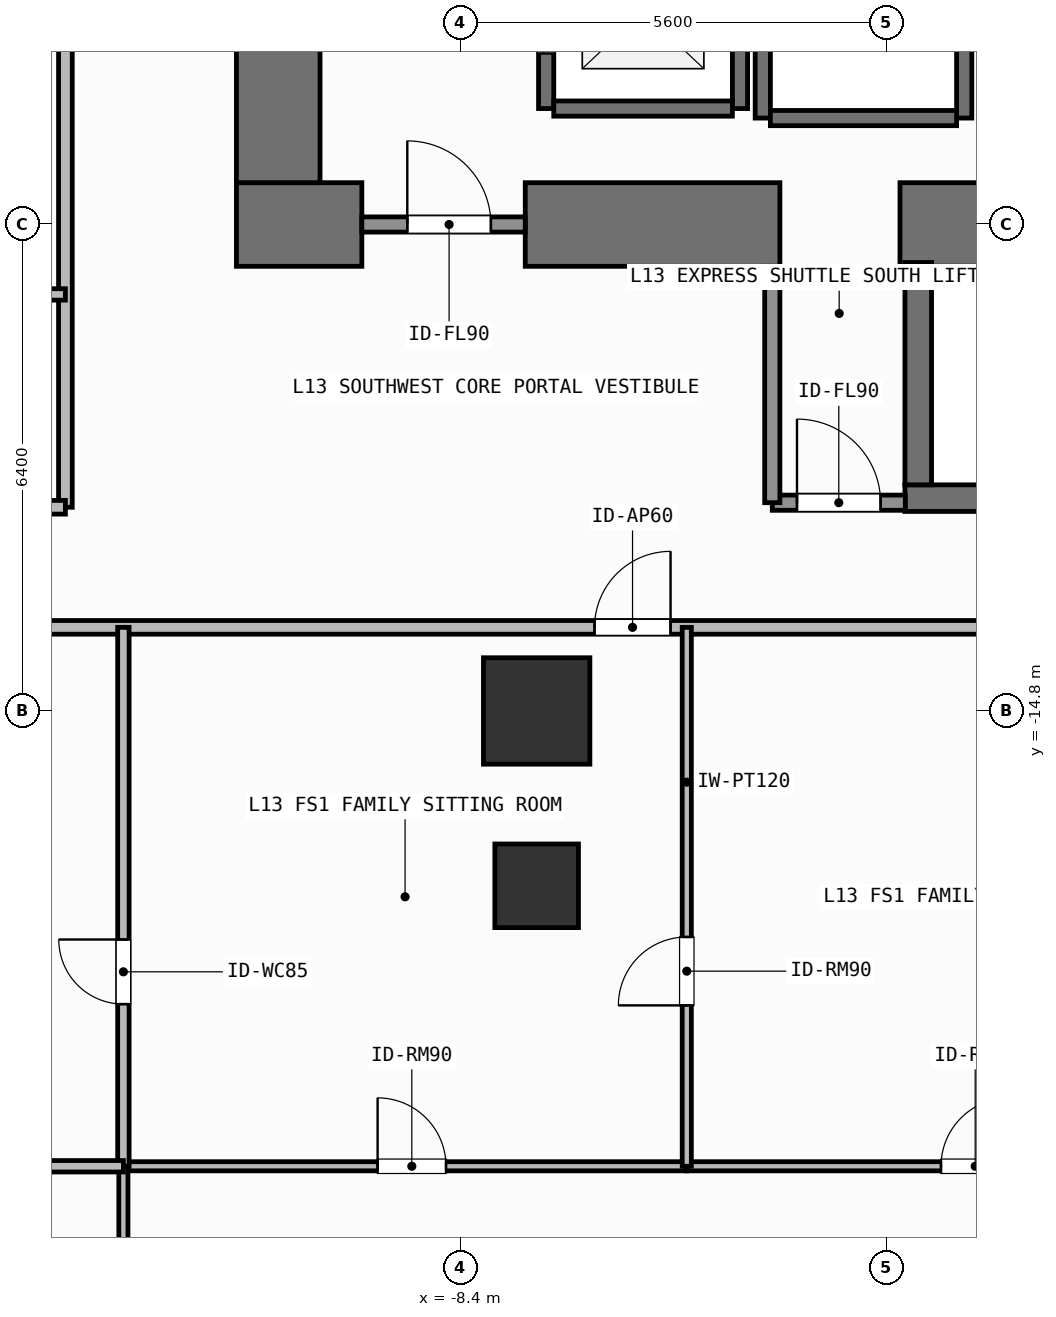
"""IFC4 building model, lengths in metres.
Left out: names, types, materials, properties, quantities, classifications, styles, units other than length and angle.
Written with IfcOpenShell. Run it as: python <this file> out.ifc"""

import sys

from ifc_helpers import new_model, si_unit, direction, frame, frame_2d, origin, origin_2d, place, context, subcontext, project, spatial, rectangle, extrude, element, fill, save


model = new_model("IFC4")
c1 = context("Model", 3, precision=1e-05, world=origin(), true_north=direction((0.0, 1.0)))
c2 = subcontext(c1, "Body", "Model", "MODEL_VIEW")
j1 = project(units=[si_unit("LENGTHUNIT", "METRE"), si_unit("PLANEANGLEUNIT", "RADIAN")], contexts=[c1])
p1 = place(None, origin())
s1 = spatial("IfcSite", under=j1, at=p1, CompositionType="ELEMENT")
p2 = place(p1, origin())
s2 = spatial("IfcBuilding", under=s1, at=p2, CompositionType="ELEMENT")
p3 = place(p2, frame((0.0, 0.0, 50.1)))
s3 = spatial("IfcBuildingStorey", under=s2, at=p3, CompositionType="ELEMENT", Elevation=50.1)
p4 = place(p3, frame((-11.35, -8.4, 0.0), z_axis=(0.0, 0.0, 1.0), x_axis=(1.0, 0.0, 0.0)))
e1 = element("IfcWall", 1, at=p4, inside=s3, PredefinedType="SHEAR", context=c2, shape_type="SweptSolid", body=[
    extrude(rectangle(XDim=1.65, YDim=1.1, at=frame_2d((0.825, 0.0))), origin(), (0.0, 0.0, 1.0), 3.9),
])
p5 = place(p3, frame((-7.55, -8.4, 0.0), z_axis=(0.0, 0.0, 1.0), x_axis=(1.0, 0.0, 0.0)))
e2 = element("IfcWall", 2, at=p5, inside=s3, PredefinedType="SHEAR", context=c2, shape_type="SweptSolid", body=[
    extrude(rectangle(XDim=3.35, YDim=1.1, at=frame_2d((1.675, 0.0))), origin(), (0.0, 0.0, 1.0), 3.9),
])
p6 = place(p3, frame((-2.62, -8.4, 0.0), z_axis=(0.0, 0.0, 1.0), x_axis=(1.0, 0.0, 0.0)))
e3 = element("IfcWall", 3, at=p6, inside=s3, PredefinedType="SHEAR", context=c2, shape_type="SweptSolid", body=[
    extrude(rectangle(XDim=7.27, YDim=1.1, at=frame_2d((3.635, 0.0))), origin(), (0.0, 0.0, 1.0), 3.9),
])
p7 = place(p3, frame((-10.8, -7.85, 0.0), z_axis=(0.0, 0.0, 1.0), x_axis=(0.0, 1.0, 0.0)))
e4 = element("IfcWall", 4, at=p7, inside=s3, PredefinedType="SHEAR", context=c2, shape_type="SweptSolid", body=[
    extrude(rectangle(XDim=15.7, YDim=1.1, at=frame_2d((7.85, 0.0))), origin(), (0.0, 0.0, 1.0), 3.9),
])
p8 = place(p3, frame((-2.555, -12.0, 0.0), z_axis=(0.0, 0.0, 1.0), x_axis=(1.0, 0.0, 0.0)))
e5 = element("IfcWall", 5, at=p8, inside=s3, PredefinedType="SHEAR", context=c2, shape_type="SweptSolid", body=[
    extrude(rectangle(XDim=7.31, YDim=0.35, at=frame_2d((3.655, 0.0))), origin(), (0.0, 0.0, 1.0), 3.9),
])
p9 = place(p3, frame((-2.2, -8.988, 0.0), z_axis=(0.0, 0.0, 1.0), x_axis=(1.0, 0.0, 0.0)))
e6 = element("IfcWall", 6, at=p9, inside=s3, PredefinedType="SHEAR", context=c2, shape_type="SweptSolid", body=[
    extrude(rectangle(XDim=6.6, YDim=0.075, at=frame_2d((3.3, 0.0))), origin(), (0.0, 0.0, 1.0), 3.9),
])
p10 = place(p3, frame((-2.38, -11.825, 0.0), z_axis=(0.0, 0.0, 1.0), x_axis=(0.0, 1.0, 0.0)))
e7 = element("IfcWall", 7, at=p10, inside=s3, PredefinedType="SHEAR", context=c2, shape_type="SweptSolid", body=[
    extrude(rectangle(XDim=2.925, YDim=0.35, at=frame_2d((1.462, 0.0))), origin(), (0.0, 0.0, 1.0), 3.9),
])
p11 = place(p3, frame((-7.4, -14.8, 0.0), z_axis=(0.0, 0.0, 1.0), x_axis=(1.0, 0.0, 0.0)))
e8 = element("IfcColumn", 8, at=p11, inside=s3, PredefinedType="COLUMN", context=c2, shape_type="SweptSolid", body=[
    extrude(rectangle(XDim=1.4, YDim=1.4, at=origin_2d()), origin(), (0.0, 0.0, 1.0), 3.9),
])
p12 = place(p3, frame((-7.4, -17.1, 0.0), z_axis=(0.0, 0.0, 1.0), x_axis=(1.0, 0.0, 0.0)))
e9 = element("IfcColumn", 9, at=p12, inside=s3, PredefinedType="COLUMN", context=c2, shape_type="SweptSolid", body=[
    extrude(rectangle(XDim=1.1, YDim=1.1, at=origin_2d()), origin(), (0.0, 0.0, 1.0), 3.9),
])
p13 = place(p3, frame((-7.275, -6.875, 0.0), z_axis=(0.0, 0.0, 1.0), x_axis=(0.0, 1.0, 0.0)))
e10 = element("IfcWall", 10, at=p13, inside=s3, PredefinedType="SHEAR", context=c2, shape_type="SweptSolid", body=[
    extrude(rectangle(XDim=2.55, YDim=0.2, at=frame_2d((1.275, 0.0))), origin(), (0.0, 0.0, 1.0), 3.62),
])
p14 = place(p13, frame((0.725, 0.0, 0.0)))
e11 = element("IfcOpeningElement", 11, at=p14, cuts=e10, PredefinedType="OPENING", context=c2, shape_type="SweptSolid", body=[
    extrude(rectangle(XDim=1.1, YDim=2.2, at=frame_2d((0.55, 1.1))), frame((0.0, 0.11, 0.0), z_axis=(0.0, -1.0, 0.0), x_axis=(1.0, 0.0, 0.0)), (0.0, 0.0, 1.0), 0.22),
])
p15 = place(p3, frame((-4.725, -6.875, 0.0), z_axis=(0.0, 0.0, 1.0), x_axis=(0.0, 1.0, 0.0)))
e12 = element("IfcWall", 12, at=p15, inside=s3, PredefinedType="SHEAR", context=c2, shape_type="SweptSolid", body=[
    extrude(rectangle(XDim=2.55, YDim=0.2, at=frame_2d((1.275, 0.0))), origin(), (0.0, 0.0, 1.0), 3.62),
])
p16 = place(p3, frame((-7.175, -6.875, 0.0), z_axis=(0.0, 0.0, 1.0), x_axis=(1.0, 0.0, 0.0)))
e13 = element("IfcWall", 13, at=p16, inside=s3, PredefinedType="SHEAR", context=c2, shape_type="SweptSolid", body=[
    extrude(rectangle(XDim=2.35, YDim=0.2, at=frame_2d((1.175, 0.0))), origin(), (0.0, 0.0, 1.0), 3.62),
])
for number, where, z_axis, x_axis in (
    (14, (-4.425, -7.0, 0.0), (0.0, 0.0, 1.0), (0.0, 1.0, 0.0)),
    (15, (-1.775, -7.0, 0.0), (0.0, 0.0, 1.0), (0.0, 1.0, 0.0)),
):
    element("IfcWall", number, at=place(p3, frame(where, z_axis=z_axis, x_axis=x_axis)), inside=s3, PredefinedType="SHEAR", context=c2, shape_type="SweptSolid", body=[
        extrude(rectangle(XDim=2.8, YDim=0.2, at=frame_2d((1.4, 0.0))), origin(), (0.0, 0.0, 1.0), 3.62),
    ])
p17 = place(p3, frame((-4.325, -7.0, 0.0), z_axis=(0.0, 0.0, 1.0), x_axis=(1.0, 0.0, 0.0)))
e16 = element("IfcWall", 16, at=p17, inside=s3, PredefinedType="SHEAR", context=c2, shape_type="SweptSolid", body=[
    extrude(rectangle(XDim=2.45, YDim=0.2, at=frame_2d((1.225, 0.0))), origin(), (0.0, 0.0, 1.0), 3.62),
])
p18 = place(p3, frame((-9.7, -8.4, 0.0), z_axis=(0.0, 0.0, 1.0), x_axis=(1.0, 0.0, 0.0)))
e17 = element("IfcWall", 17, at=p18, inside=s3, PredefinedType="SOLIDWALL", context=c2, shape_type="SweptSolid", body=[
    extrude(rectangle(XDim=2.15, YDim=0.2, at=frame_2d((1.075, 0.0))), origin(), (0.0, 0.0, 1.0), 2.66),
])
p19 = place(p18, frame((0.598, 0.0, 0.0)))
e18 = element("IfcOpeningElement", 18, at=p19, cuts=e17, PredefinedType="OPENING", context=c2, shape_type="SweptSolid", body=[
    extrude(rectangle(XDim=1.1, YDim=2.15, at=frame_2d((0.55, 1.075))), frame((0.0, 0.11, 0.0), z_axis=(0.0, -1.0, 0.0), x_axis=(1.0, 0.0, 0.0)), (0.0, 0.0, 1.0), 0.22),
])
p20 = place(p3, frame((-4.3, -12.06, 0.0), z_axis=(0.0, 0.0, 1.0), x_axis=(1.0, 0.0, 0.0)))
e19 = element("IfcWall", 19, at=p20, inside=s3, PredefinedType="SOLIDWALL", context=c2, shape_type="SweptSolid", body=[
    extrude(rectangle(XDim=1.75, YDim=0.2, at=frame_2d((0.875, 0.0))), origin(), (0.0, 0.0, 1.0), 3.62),
])
p21 = place(p20, frame((0.325, 0.0, 0.0)))
e20 = element("IfcOpeningElement", 20, at=p21, cuts=e19, PredefinedType="OPENING", context=c2, shape_type="SweptSolid", body=[
    extrude(rectangle(XDim=1.1, YDim=2.15, at=frame_2d((0.55, 1.075))), frame((0.0, 0.11, 0.0), z_axis=(0.0, -1.0, 0.0), x_axis=(1.0, 0.0, 0.0)), (0.0, 0.0, 1.0), 0.22),
])
p22 = place(p3, frame((-18.62, -13.7, 0.0), z_axis=(0.0, 0.0, 1.0), x_axis=(1.0, 0.0, 0.0)))
e21 = element("IfcWall", 21, at=p22, inside=s3, PredefinedType="PARTITIONING", context=c2, shape_type="SweptSolid", body=[
    extrude(rectangle(XDim=24.963, YDim=0.18, at=frame_2d((12.481, 0.0))), origin(), (0.0, 0.0, 1.0), 3.62),
])
p23 = place(p22, frame((11.981, 0.0, 0.0)))
e22 = element("IfcOpeningElement", 22, at=p23, cuts=e21, PredefinedType="OPENING", context=c2, shape_type="SweptSolid", body=[
    extrude(rectangle(XDim=1.0, YDim=2.2, at=frame_2d((0.5, 1.1))), frame((0.0, 0.1, 0.0), z_axis=(0.0, -1.0, 0.0), x_axis=(1.0, 0.0, 0.0)), (0.0, 0.0, 1.0), 0.2),
])
p24 = place(p3, frame((-12.837, -20.79, 0.0), z_axis=(0.0, 0.0, 1.0), x_axis=(1.0, 0.0, 0.0)))
e23 = element("IfcWall", 23, at=p24, inside=s3, PredefinedType="PARTITIONING", context=c2, shape_type="SweptSolid", body=[
    extrude(rectangle(XDim=7.412, YDim=0.12, at=frame_2d((3.706, 0.0))), origin(), (0.0, 0.0, 1.0), 3.62),
])
p25 = place(p24, frame((3.344, 0.0, 0.0)))
e24 = element("IfcOpeningElement", 24, at=p25, cuts=e23, PredefinedType="OPENING", context=c2, shape_type="SweptSolid", body=[
    extrude(rectangle(XDim=0.9, YDim=2.1, at=frame_2d((0.45, 1.05))), frame((0.0, 0.07, 0.0), z_axis=(0.0, -1.0, 0.0), x_axis=(1.0, 0.0, 0.0)), (0.0, 0.0, 1.0), 0.14),
])
p26 = place(p3, frame((-5.425, -20.79, 0.0), z_axis=(0.0, 0.0, 1.0), x_axis=(1.0, 0.0, 0.0)))
e25 = element("IfcWall", 25, at=p26, inside=s3, PredefinedType="PARTITIONING", context=c2, shape_type="SweptSolid", body=[
    extrude(rectangle(XDim=7.412, YDim=0.12, at=frame_2d((3.706, 0.0))), origin(), (0.0, 0.0, 1.0), 3.62),
])
p27 = place(p26, frame((3.344, 0.0, 0.0)))
e26 = element("IfcOpeningElement", 26, at=p27, cuts=e25, PredefinedType="OPENING", context=c2, shape_type="SweptSolid", body=[
    extrude(rectangle(XDim=0.9, YDim=2.1, at=frame_2d((0.45, 1.05))), frame((0.0, 0.07, 0.0), z_axis=(0.0, -1.0, 0.0), x_axis=(1.0, 0.0, 0.0)), (0.0, 0.0, 1.0), 0.14),
])
p28 = place(p3, frame((-5.425, -20.79, 0.0), z_axis=(0.0, 0.0, 1.0), x_axis=(0.0, 1.0, 0.0)))
e27 = element("IfcWall", 27, at=p28, inside=s3, PredefinedType="PARTITIONING", context=c2, shape_type="SweptSolid", body=[
    extrude(rectangle(XDim=7.09, YDim=0.12, at=frame_2d((3.545, 0.0))), origin(), (0.0, 0.0, 1.0), 3.62),
])
p29 = place(p28, frame((2.117, 0.0, 0.0)))
e28 = element("IfcOpeningElement", 28, at=p29, cuts=e27, PredefinedType="OPENING", context=c2, shape_type="SweptSolid", body=[
    extrude(rectangle(XDim=0.9, YDim=2.1, at=frame_2d((0.45, 1.05))), frame((0.0, 0.07, 0.0), z_axis=(0.0, -1.0, 0.0), x_axis=(1.0, 0.0, 0.0)), (0.0, 0.0, 1.0), 0.14),
])
p30 = place(p3, frame((-12.837, -20.79, 0.0), z_axis=(0.0, 0.0, 1.0), x_axis=(0.0, 1.0, 0.0)))
e29 = element("IfcWall", 29, at=p30, inside=s3, PredefinedType="PARTITIONING", context=c2, shape_type="SweptSolid", body=[
    extrude(rectangle(XDim=7.09, YDim=0.15, at=frame_2d((3.545, 0.0))), origin(), (0.0, 0.0, 1.0), 3.62),
])
p31 = place(p30, frame((2.133, 0.0, 0.0)))
e30 = element("IfcOpeningElement", 30, at=p31, cuts=e29, PredefinedType="OPENING", context=c2, shape_type="SweptSolid", body=[
    extrude(rectangle(XDim=0.85, YDim=2.1, at=frame_2d((0.425, 1.05))), frame((0.0, 0.085, 0.0), z_axis=(0.0, -1.0, 0.0), x_axis=(1.0, 0.0, 0.0)), (0.0, 0.0, 1.0), 0.17),
])
p32 = place(p3, frame((-12.837, -25.03, 0.0), z_axis=(0.0, 0.0, 1.0), x_axis=(0.0, 1.0, 0.0)))
e31 = element("IfcWall", 31, at=p32, inside=s3, PredefinedType="PARTITIONING", context=c2, shape_type="SweptSolid", body=[
    extrude(rectangle(XDim=4.24, YDim=0.12, at=frame_2d((2.12, 0.0))), origin(), (0.0, 0.0, 1.0), 3.62),
])
p33 = place(p32, frame((1.581, 0.0, 0.0)))
e32 = element("IfcOpeningElement", 32, at=p33, cuts=e31, PredefinedType="OPENING", context=c2, shape_type="SweptSolid", body=[
    extrude(rectangle(XDim=0.9, YDim=2.1, at=frame_2d((0.45, 1.05))), frame((0.0, 0.07, 0.0), z_axis=(0.0, -1.0, 0.0), x_axis=(1.0, 0.0, 0.0)), (0.0, 0.0, 1.0), 0.14),
])
p34 = place(p3, frame((-13.6, -12.12, 0.0), z_axis=(0.0, 0.0, 1.0), x_axis=(0.0, 1.0, 0.0)))
e33 = element("IfcWall", 33, at=p34, inside=s3, PredefinedType="PARTITIONING", context=c2, shape_type="SweptSolid", body=[
    extrude(rectangle(XDim=24.24, YDim=0.18, at=frame_2d((12.12, 0.0))), origin(), (0.0, 0.0, 1.0), 3.62),
])
p35 = place(p34, frame((9.829, 0.0, 0.0)))
e34 = element("IfcOpeningElement", 34, at=p35, cuts=e33, PredefinedType="OPENING", context=c2, shape_type="SweptSolid", body=[
    extrude(rectangle(XDim=1.0, YDim=2.2, at=frame_2d((0.5, 1.1))), frame((0.0, 0.1, 0.0), z_axis=(0.0, -1.0, 0.0), x_axis=(1.0, 0.0, 0.0)), (0.0, 0.0, 1.0), 0.2),
])
p36 = place(p3, frame((-16.808, -9.32, 0.0), z_axis=(0.0, 0.0, 1.0), x_axis=(1.0, 0.0, 0.0)))
e35 = element("IfcWall", 35, at=p36, inside=s3, PredefinedType="PARTITIONING", context=c2, shape_type="SweptSolid", body=[
    extrude(rectangle(XDim=3.208, YDim=0.15, at=frame_2d((1.604, 0.0))), origin(), (0.0, 0.0, 1.0), 3.62),
])
p37 = place(p36, frame((0.33, 0.0, 0.0)))
e36 = element("IfcOpeningElement", 36, at=p37, cuts=e35, PredefinedType="OPENING", context=c2, shape_type="SweptSolid", body=[
    extrude(rectangle(XDim=0.85, YDim=2.1, at=frame_2d((0.425, 1.05))), frame((0.0, 0.085, 0.0), z_axis=(0.0, -1.0, 0.0), x_axis=(1.0, 0.0, 0.0)), (0.0, 0.0, 1.0), 0.17),
])
p38 = place(p3, frame((-4.3, -12.06, 0.0), z_axis=(0.0, 0.0, 1.0), x_axis=(0.0, 1.0, 0.0)))
e37 = element("IfcWall", 37, at=p38, inside=s3, PredefinedType="SOLIDWALL", context=c2, shape_type="SweptSolid", body=[
    extrude(rectangle(XDim=3.11, YDim=0.2, at=frame_2d((1.555, 0.0))), origin(), (0.0, 0.0, 1.0), 3.62),
])
p39 = place(p3, frame((-18.62, -20.79, 0.0), z_axis=(0.0, 0.0, 1.0), x_axis=(1.0, 0.0, 0.0)))
e38 = element("IfcWall", 38, at=p39, inside=s3, PredefinedType="PARTITIONING", context=c2, shape_type="SweptSolid", body=[
    extrude(rectangle(XDim=5.783, YDim=0.15, at=frame_2d((2.892, 0.0))), origin(), (0.0, 0.0, 1.0), 3.62),
])
p40 = place(p3, frame((-22.13, -12.12, 0.0), z_axis=(0.0, 0.0, 1.0), x_axis=(1.0, 0.0, 0.0)))
e39 = element("IfcWall", 39, at=p40, inside=s3, PredefinedType="PARTITIONING", context=c2, shape_type="SweptSolid", body=[
    extrude(rectangle(XDim=8.53, YDim=0.18, at=frame_2d((4.265, 0.0))), origin(), (0.0, 0.0, 1.0), 3.62),
])
p41 = place(p14, origin())
e40 = element("IfcDoor", 40, at=p41, inside=s3, OperationType="SLIDING_TO_LEFT", PredefinedType="DOOR", context=c2, shape_type="SweptSolid", body=[
    extrude(rectangle(XDim=1.1, YDim=2.2, at=frame_2d((0.55, 1.1))), frame((0.0, 0.025, 0.0), z_axis=(0.0, -1.0, 0.0), x_axis=(1.0, 0.0, 0.0)), (0.0, 0.0, 1.0), 0.05),
])
fill(e11, e40)
p42 = place(p19, origin())
e41 = element("IfcDoor", 41, at=p42, inside=s3, OperationType="SINGLE_SWING_LEFT", PredefinedType="DOOR", context=c2, shape_type="SweptSolid", body=[
    extrude(rectangle(XDim=1.1, YDim=2.15, at=frame_2d((0.55, 1.075))), frame((0.0, 0.025, 0.0), z_axis=(0.0, -1.0, 0.0), x_axis=(1.0, 0.0, 0.0)), (0.0, 0.0, 1.0), 0.05),
])
fill(e18, e41)
p43 = place(p21, origin())
e42 = element("IfcDoor", 42, at=p43, inside=s3, OperationType="SINGLE_SWING_LEFT", PredefinedType="DOOR", context=c2, shape_type="SweptSolid", body=[
    extrude(rectangle(XDim=1.1, YDim=2.15, at=frame_2d((0.55, 1.075))), frame((0.0, 0.025, 0.0), z_axis=(0.0, -1.0, 0.0), x_axis=(1.0, 0.0, 0.0)), (0.0, 0.0, 1.0), 0.05),
])
fill(e20, e42)
p44 = place(p23, origin())
e43 = element("IfcDoor", 43, at=p44, inside=s3, OperationType="SINGLE_SWING_RIGHT", PredefinedType="DOOR", context=c2, shape_type="SweptSolid", body=[
    extrude(rectangle(XDim=1.0, YDim=2.2, at=frame_2d((0.5, 1.1))), frame((0.0, 0.025, 0.0), z_axis=(0.0, -1.0, 0.0), x_axis=(1.0, 0.0, 0.0)), (0.0, 0.0, 1.0), 0.05),
])
fill(e22, e43)
p45 = place(p25, origin())
e44 = element("IfcDoor", 44, at=p45, inside=s3, OperationType="SINGLE_SWING_LEFT", PredefinedType="DOOR", context=c2, shape_type="SweptSolid", body=[
    extrude(rectangle(XDim=0.9, YDim=2.1, at=frame_2d((0.45, 1.05))), frame((0.0, 0.025, 0.0), z_axis=(0.0, -1.0, 0.0), x_axis=(1.0, 0.0, 0.0)), (0.0, 0.0, 1.0), 0.05),
])
fill(e24, e44)
p46 = place(p27, origin())
e45 = element("IfcDoor", 45, at=p46, inside=s3, OperationType="SINGLE_SWING_RIGHT", PredefinedType="DOOR", context=c2, shape_type="SweptSolid", body=[
    extrude(rectangle(XDim=0.9, YDim=2.1, at=frame_2d((0.45, 1.05))), frame((0.0, 0.025, 0.0), z_axis=(0.0, -1.0, 0.0), x_axis=(1.0, 0.0, 0.0)), (0.0, 0.0, 1.0), 0.05),
])
fill(e26, e45)
p47 = place(p29, origin())
e46 = element("IfcDoor", 46, at=p47, inside=s3, OperationType="SINGLE_SWING_LEFT", PredefinedType="DOOR", context=c2, shape_type="SweptSolid", body=[
    extrude(rectangle(XDim=0.9, YDim=2.1, at=frame_2d((0.45, 1.05))), frame((0.0, 0.025, 0.0), z_axis=(0.0, -1.0, 0.0), x_axis=(1.0, 0.0, 0.0)), (0.0, 0.0, 1.0), 0.05),
])
fill(e28, e46)
p48 = place(p31, origin())
e47 = element("IfcDoor", 47, at=p48, inside=s3, OperationType="SINGLE_SWING_RIGHT", PredefinedType="DOOR", context=c2, shape_type="SweptSolid", body=[
    extrude(rectangle(XDim=0.85, YDim=2.1, at=frame_2d((0.425, 1.05))), frame((0.0, 0.025, 0.0), z_axis=(0.0, -1.0, 0.0), x_axis=(1.0, 0.0, 0.0)), (0.0, 0.0, 1.0), 0.05),
])
fill(e30, e47)
save(model, sys.argv[1])
